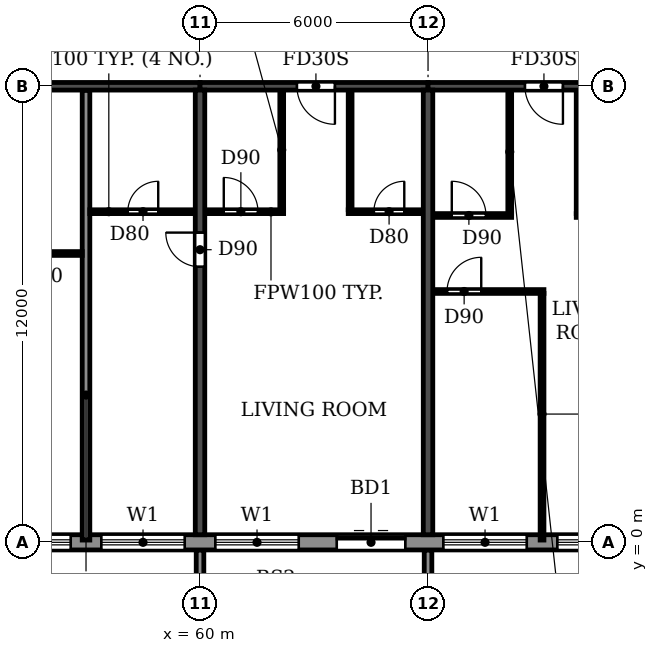
"""IFC4 building model, lengths in metres.
Left out: names, types, materials, properties, quantities, classifications, styles, units other than length and angle.
Written with IfcOpenShell. Run it as: python <this file> out.ifc"""

import sys

from ifc_helpers import new_model, si_unit, direction, frame, frame_2d, origin, place, context, subcontext, project, spatial, polyline, rectangle, outline, extrude, source, transform, mapped, element, fill, save


model = new_model("IFC4")
c1 = context("Model", 3, precision=1e-05, world=origin(), true_north=direction((0.0, 1.0)))
c2 = subcontext(c1, "Body", "Model", "MODEL_VIEW")
j1 = project(units=[si_unit("LENGTHUNIT", "METRE"), si_unit("PLANEANGLEUNIT", "RADIAN")], contexts=[c1])
p1 = place(None, origin())
s1 = spatial("IfcSite", under=j1, at=p1, CompositionType="ELEMENT")
p2 = place(p1, origin())
s2 = spatial("IfcBuilding", under=s1, at=p2, CompositionType="ELEMENT")
p3 = place(p2, frame((0.0, 0.0, 257.7)))
s3 = spatial("IfcBuildingStorey", under=s2, at=p3, CompositionType="ELEMENT", Elevation=257.7)
p4 = place(p3, frame((60.0, 0.2, 0.0), z_axis=(0.0, 0.0, 1.0), x_axis=(0.0, 1.0, 0.0)))
e1 = element("IfcWall", 1, at=p4, inside=s3, PredefinedType="SHEAR", context=c2, shape_type="SweptSolid", body=[
    extrude(rectangle(XDim=11.7, YDim=0.25, at=frame_2d((5.85, 0.0))), origin(), (0.0, 0.0, 1.0), 3.0),
])
p5 = place(p4, frame((7.05, 0.0, 0.0)))
e2 = element("IfcOpeningElement", 2, at=p5, cuts=e1, PredefinedType="OPENING", context=c2, shape_type="SweptSolid", body=[
    extrude(rectangle(XDim=0.9, YDim=2.1, at=frame_2d((0.45, 1.05))), frame((0.0, 0.135, 0.0), z_axis=(0.0, -1.0, 0.0), x_axis=(1.0, 0.0, 0.0)), (0.0, 0.0, 1.0), 0.27),
])
p6 = place(p3, frame((66.0, 0.2, 0.0), z_axis=(0.0, 0.0, 1.0), x_axis=(0.0, 1.0, 0.0)))
e3 = element("IfcWall", 3, at=p6, inside=s3, PredefinedType="SHEAR", context=c2, shape_type="SweptSolid", body=[
    extrude(rectangle(XDim=11.7, YDim=0.25, at=frame_2d((5.85, 0.0))), origin(), (0.0, 0.0, 1.0), 3.0),
])
p7 = place(p3, frame((54.0, 12.0, 0.0), z_axis=(0.0, 0.0, 1.0), x_axis=(1.0, 0.0, 0.0)))
e4 = element("IfcWall", 4, at=p7, inside=s3, PredefinedType="SHEAR", context=c2, shape_type="SweptSolid", body=[
    extrude(rectangle(XDim=6.0, YDim=0.2, at=frame_2d((3.0, 0.0))), origin(), (0.0, 0.0, 1.0), 2.4),
])
p8 = place(p3, frame((60.0, 12.0, 0.0), z_axis=(0.0, 0.0, 1.0), x_axis=(1.0, 0.0, 0.0)))
e5 = element("IfcWall", 5, at=p8, inside=s3, PredefinedType="SHEAR", context=c2, shape_type="SweptSolid", body=[
    extrude(rectangle(XDim=6.0, YDim=0.2, at=frame_2d((3.0, 0.0))), origin(), (0.0, 0.0, 1.0), 2.4),
])
p9 = place(p8, frame((2.55, 0.0, 0.0)))
e6 = element("IfcOpeningElement", 6, at=p9, cuts=e5, PredefinedType="OPENING", context=c2, shape_type="SweptSolid", body=[
    extrude(rectangle(XDim=1.0, YDim=2.1, at=frame_2d((0.5, 1.05))), frame((0.0, 0.11, 0.0), z_axis=(0.0, -1.0, 0.0), x_axis=(1.0, 0.0, 0.0)), (0.0, 0.0, 1.0), 0.22),
])
p10 = place(p3, frame((66.0, 12.0, 0.0), z_axis=(0.0, 0.0, 1.0), x_axis=(1.0, 0.0, 0.0)))
e7 = element("IfcWall", 7, at=p10, inside=s3, PredefinedType="SHEAR", context=c2, shape_type="SweptSolid", body=[
    extrude(rectangle(XDim=6.0, YDim=0.2, at=frame_2d((3.0, 0.0))), origin(), (0.0, 0.0, 1.0), 2.4),
])
p11 = place(p10, frame((2.55, 0.0, 0.0)))
e8 = element("IfcOpeningElement", 8, at=p11, cuts=e7, PredefinedType="OPENING", context=c2, shape_type="SweptSolid", body=[
    extrude(rectangle(XDim=1.0, YDim=2.1, at=frame_2d((0.5, 1.05))), frame((0.0, 0.11, 0.0), z_axis=(0.0, -1.0, 0.0), x_axis=(1.0, 0.0, 0.0)), (0.0, 0.0, 1.0), 0.22),
])
p12 = place(p3, frame((22.683, 0.0, 0.0), z_axis=(0.0, 0.0, 1.0), x_axis=(1.0, 0.0, 0.0)))
e9 = element("IfcWall", 9, at=p12, inside=s3, PredefinedType="STANDARD", context=c2, shape_type="SweptSolid", body=[
    extrude(rectangle(XDim=56.634, YDim=0.4, at=frame_2d((28.317, 0.0))), origin(), (0.0, 0.0, 1.0), 3.0),
])
p13 = place(p12, frame((1.717, 0.0, 0.9)))
e10 = element("IfcOpeningElement", 10, at=p13, cuts=e9, PredefinedType="OPENING", context=c2, shape_type="SweptSolid", body=[
    extrude(rectangle(XDim=2.2, YDim=1.5, at=frame_2d((1.1, 0.75))), frame((0.0, 0.21, 0.0), z_axis=(0.0, -1.0, 0.0), x_axis=(1.0, 0.0, 0.0)), (0.0, 0.0, 1.0), 0.42),
])
p14 = place(p12, frame((4.917, 0.0, 0.0)))
e11 = element("IfcOpeningElement", 11, at=p14, cuts=e9, PredefinedType="OPENING", context=c2, shape_type="SweptSolid", body=[
    extrude(rectangle(XDim=1.8, YDim=2.4, at=frame_2d((0.9, 1.2))), frame((0.0, 0.21, 0.0), z_axis=(0.0, -1.0, 0.0), x_axis=(1.0, 0.0, 0.0)), (0.0, 0.0, 1.0), 0.42),
])
p15 = place(p12, frame((7.717, 0.0, 0.9)))
e12 = element("IfcOpeningElement", 12, at=p15, cuts=e9, PredefinedType="OPENING", context=c2, shape_type="SweptSolid", body=[
    extrude(rectangle(XDim=2.2, YDim=1.5, at=frame_2d((1.1, 0.75))), frame((0.0, 0.21, 0.0), z_axis=(0.0, -1.0, 0.0), x_axis=(1.0, 0.0, 0.0)), (0.0, 0.0, 1.0), 0.42),
])
p16 = place(p12, frame((10.717, 0.0, 0.9)))
e13 = element("IfcOpeningElement", 13, at=p16, cuts=e9, PredefinedType="OPENING", context=c2, shape_type="SweptSolid", body=[
    extrude(rectangle(XDim=2.2, YDim=1.5, at=frame_2d((1.1, 0.75))), frame((0.0, 0.21, 0.0), z_axis=(0.0, -1.0, 0.0), x_axis=(1.0, 0.0, 0.0)), (0.0, 0.0, 1.0), 0.42),
])
p17 = place(p12, frame((13.717, 0.0, 0.9)))
e14 = element("IfcOpeningElement", 14, at=p17, cuts=e9, PredefinedType="OPENING", context=c2, shape_type="SweptSolid", body=[
    extrude(rectangle(XDim=2.2, YDim=1.5, at=frame_2d((1.1, 0.75))), frame((0.0, 0.21, 0.0), z_axis=(0.0, -1.0, 0.0), x_axis=(1.0, 0.0, 0.0)), (0.0, 0.0, 1.0), 0.42),
])
p18 = place(p12, frame((16.917, 0.0, 0.0)))
e15 = element("IfcOpeningElement", 15, at=p18, cuts=e9, PredefinedType="OPENING", context=c2, shape_type="SweptSolid", body=[
    extrude(rectangle(XDim=1.8, YDim=2.4, at=frame_2d((0.9, 1.2))), frame((0.0, 0.21, 0.0), z_axis=(0.0, -1.0, 0.0), x_axis=(1.0, 0.0, 0.0)), (0.0, 0.0, 1.0), 0.42),
])
p19 = place(p12, frame((19.717, 0.0, 0.9)))
e16 = element("IfcOpeningElement", 16, at=p19, cuts=e9, PredefinedType="OPENING", context=c2, shape_type="SweptSolid", body=[
    extrude(rectangle(XDim=2.2, YDim=1.5, at=frame_2d((1.1, 0.75))), frame((0.0, 0.21, 0.0), z_axis=(0.0, -1.0, 0.0), x_axis=(1.0, 0.0, 0.0)), (0.0, 0.0, 1.0), 0.42),
])
p20 = place(p12, frame((22.717, 0.0, 0.9)))
e17 = element("IfcOpeningElement", 17, at=p20, cuts=e9, PredefinedType="OPENING", context=c2, shape_type="SweptSolid", body=[
    extrude(rectangle(XDim=2.2, YDim=1.5, at=frame_2d((1.1, 0.75))), frame((0.0, 0.21, 0.0), z_axis=(0.0, -1.0, 0.0), x_axis=(1.0, 0.0, 0.0)), (0.0, 0.0, 1.0), 0.42),
])
p21 = place(p12, frame((25.717, 0.0, 0.9)))
e18 = element("IfcOpeningElement", 18, at=p21, cuts=e9, PredefinedType="OPENING", context=c2, shape_type="SweptSolid", body=[
    extrude(rectangle(XDim=2.2, YDim=1.5, at=frame_2d((1.1, 0.75))), frame((0.0, 0.21, 0.0), z_axis=(0.0, -1.0, 0.0), x_axis=(1.0, 0.0, 0.0)), (0.0, 0.0, 1.0), 0.42),
])
p22 = place(p12, frame((28.917, 0.0, 0.0)))
e19 = element("IfcOpeningElement", 19, at=p22, cuts=e9, PredefinedType="OPENING", context=c2, shape_type="SweptSolid", body=[
    extrude(rectangle(XDim=1.8, YDim=2.4, at=frame_2d((0.9, 1.2))), frame((0.0, 0.21, 0.0), z_axis=(0.0, -1.0, 0.0), x_axis=(1.0, 0.0, 0.0)), (0.0, 0.0, 1.0), 0.42),
])
p23 = place(p12, frame((31.717, 0.0, 0.9)))
e20 = element("IfcOpeningElement", 20, at=p23, cuts=e9, PredefinedType="OPENING", context=c2, shape_type="SweptSolid", body=[
    extrude(rectangle(XDim=2.2, YDim=1.5, at=frame_2d((1.1, 0.75))), frame((0.0, 0.21, 0.0), z_axis=(0.0, -1.0, 0.0), x_axis=(1.0, 0.0, 0.0)), (0.0, 0.0, 1.0), 0.42),
])
p24 = place(p12, frame((34.717, 0.0, 0.9)))
e21 = element("IfcOpeningElement", 21, at=p24, cuts=e9, PredefinedType="OPENING", context=c2, shape_type="SweptSolid", body=[
    extrude(rectangle(XDim=2.2, YDim=1.5, at=frame_2d((1.1, 0.75))), frame((0.0, 0.21, 0.0), z_axis=(0.0, -1.0, 0.0), x_axis=(1.0, 0.0, 0.0)), (0.0, 0.0, 1.0), 0.42),
])
p25 = place(p12, frame((37.717, 0.0, 0.9)))
e22 = element("IfcOpeningElement", 22, at=p25, cuts=e9, PredefinedType="OPENING", context=c2, shape_type="SweptSolid", body=[
    extrude(rectangle(XDim=2.2, YDim=1.5, at=frame_2d((1.1, 0.75))), frame((0.0, 0.21, 0.0), z_axis=(0.0, -1.0, 0.0), x_axis=(1.0, 0.0, 0.0)), (0.0, 0.0, 1.0), 0.42),
])
p26 = place(p12, frame((40.917, 0.0, 0.0)))
e23 = element("IfcOpeningElement", 23, at=p26, cuts=e9, PredefinedType="OPENING", context=c2, shape_type="SweptSolid", body=[
    extrude(rectangle(XDim=1.8, YDim=2.4, at=frame_2d((0.9, 1.2))), frame((0.0, 0.21, 0.0), z_axis=(0.0, -1.0, 0.0), x_axis=(1.0, 0.0, 0.0)), (0.0, 0.0, 1.0), 0.42),
])
p27 = place(p12, frame((43.717, 0.0, 0.9)))
e24 = element("IfcOpeningElement", 24, at=p27, cuts=e9, PredefinedType="OPENING", context=c2, shape_type="SweptSolid", body=[
    extrude(rectangle(XDim=2.2, YDim=1.5, at=frame_2d((1.1, 0.75))), frame((0.0, 0.21, 0.0), z_axis=(0.0, -1.0, 0.0), x_axis=(1.0, 0.0, 0.0)), (0.0, 0.0, 1.0), 0.42),
])
p28 = place(p12, frame((46.717, 0.0, 0.9)))
e25 = element("IfcOpeningElement", 25, at=p28, cuts=e9, PredefinedType="OPENING", context=c2, shape_type="SweptSolid", body=[
    extrude(rectangle(XDim=2.2, YDim=1.5, at=frame_2d((1.1, 0.75))), frame((0.0, 0.21, 0.0), z_axis=(0.0, -1.0, 0.0), x_axis=(1.0, 0.0, 0.0)), (0.0, 0.0, 1.0), 0.42),
])
p29 = place(p12, frame((49.717, 0.0, 0.9)))
e26 = element("IfcOpeningElement", 26, at=p29, cuts=e9, PredefinedType="OPENING", context=c2, shape_type="SweptSolid", body=[
    extrude(rectangle(XDim=2.2, YDim=1.5, at=frame_2d((1.1, 0.75))), frame((0.0, 0.21, 0.0), z_axis=(0.0, -1.0, 0.0), x_axis=(1.0, 0.0, 0.0)), (0.0, 0.0, 1.0), 0.42),
])
p30 = place(p12, frame((52.917, 0.0, 0.0)))
e27 = element("IfcOpeningElement", 27, at=p30, cuts=e9, PredefinedType="OPENING", context=c2, shape_type="SweptSolid", body=[
    extrude(rectangle(XDim=1.8, YDim=2.4, at=frame_2d((0.9, 1.2))), frame((0.0, 0.21, 0.0), z_axis=(0.0, -1.0, 0.0), x_axis=(1.0, 0.0, 0.0)), (0.0, 0.0, 1.0), 0.42),
])
m1 = source(origin(), c2, "Body", "SweptSolid", [
    extrude(outline(polyline([(0.0, 0.0), (0.2, 0.0), (0.2, 1.65), (0.0, 1.65), (0.0, 0.0)])), origin(), (0.0, 0.0, 1.0), 3.1),
])
for number, where in (
    (28, (59.9, -1.85, 0.0)),
    (29, (65.9, -1.85, 0.0)),
):
    element("IfcWall", number, at=place(p3, frame(where)), inside=s3, PredefinedType="STANDARD", context=c2, shape_type="MappedRepresentation", body=[
        mapped(m1, transform((0.0, 0.0, 0.0))),
    ])
p31 = place(p3, frame((57.0, 0.06, 0.0), z_axis=(0.0, 0.0, 1.0), x_axis=(0.0, 1.0, 0.0)))
e30 = element("IfcWall", 30, at=p31, inside=s3, PredefinedType="PARTITIONING", context=c2, shape_type="SweptSolid", body=[
    extrude(rectangle(XDim=11.83, YDim=0.2, at=frame_2d((5.915, 0.0))), origin(), (0.0, 0.0, 1.0), 3.0),
])
p32 = place(p3, frame((66.135, 6.6, 0.0), z_axis=(0.0, 0.0, 1.0), x_axis=(1.0, 0.0, 0.0)))
e31 = element("IfcWall", 31, at=p32, inside=s3, PredefinedType="PARTITIONING", context=c2, shape_type="SweptSolid", body=[
    extrude(rectangle(XDim=2.915, YDim=0.1, at=frame_2d((1.458, 0.0))), origin(), (0.0, 0.0, 1.0), 3.0),
])
p33 = place(p32, frame((0.365, 0.0, 0.0)))
e32 = element("IfcOpeningElement", 32, at=p33, cuts=e31, PredefinedType="OPENING", context=c2, shape_type="SweptSolid", body=[
    extrude(rectangle(XDim=0.9, YDim=2.1, at=frame_2d((0.45, 1.05))), frame((0.0, 0.06, 0.0), z_axis=(0.0, -1.0, 0.0), x_axis=(1.0, 0.0, 0.0)), (0.0, 0.0, 1.0), 0.12),
])
p34 = place(p3, frame((54.135, 7.6, 0.0), z_axis=(0.0, 0.0, 1.0), x_axis=(1.0, 0.0, 0.0)))
e33 = element("IfcWall", 33, at=p34, inside=s3, PredefinedType="PARTITIONING", context=c2, shape_type="SweptSolid", body=[
    extrude(rectangle(XDim=2.765, YDim=0.1, at=frame_2d((1.382, 0.0))), origin(), (0.0, 0.0, 1.0), 3.0),
])
p35 = place(p34, frame((0.965, 0.0, 0.0)))
e34 = element("IfcOpeningElement", 34, at=p35, cuts=e33, PredefinedType="OPENING", context=c2, shape_type="SweptSolid", body=[
    extrude(rectangle(XDim=0.8, YDim=2.1, at=frame_2d((0.4, 1.05))), frame((0.0, 0.06, 0.0), z_axis=(0.0, -1.0, 0.0), x_axis=(1.0, 0.0, 0.0)), (0.0, 0.0, 1.0), 0.12),
])
p36 = place(p3, frame((66.135, 8.6, 0.0), z_axis=(0.0, 0.0, 1.0), x_axis=(1.0, 0.0, 0.0)))
e35 = element("IfcWall", 35, at=p36, inside=s3, PredefinedType="PARTITIONING", context=c2, shape_type="SweptSolid", body=[
    extrude(rectangle(XDim=2.065, YDim=0.1, at=frame_2d((1.032, 0.0))), origin(), (0.0, 0.0, 1.0), 3.0),
])
p37 = place(p36, frame((0.49, 0.0, 0.0)))
e36 = element("IfcOpeningElement", 36, at=p37, cuts=e35, PredefinedType="OPENING", context=c2, shape_type="SweptSolid", body=[
    extrude(rectangle(XDim=0.9, YDim=2.1, at=frame_2d((0.45, 1.05))), frame((0.0, 0.06, 0.0), z_axis=(0.0, -1.0, 0.0), x_axis=(1.0, 0.0, 0.0)), (0.0, 0.0, 1.0), 0.12),
])
p38 = place(p3, frame((69.9, 8.6, 0.0), z_axis=(0.0, 0.0, 1.0), x_axis=(1.0, 0.0, 0.0)))
e37 = element("IfcWall", 37, at=p38, inside=s3, PredefinedType="PARTITIONING", context=c2, shape_type="SweptSolid", body=[
    extrude(rectangle(XDim=1.965, YDim=0.1, at=frame_2d((0.982, 0.0))), origin(), (0.0, 0.0, 1.0), 3.0),
])
p39 = place(p38, frame((0.675, 0.0, 0.0)))
e38 = element("IfcOpeningElement", 38, at=p39, cuts=e37, PredefinedType="OPENING", context=c2, shape_type="SweptSolid", body=[
    extrude(rectangle(XDim=0.8, YDim=2.1, at=frame_2d((0.4, 1.05))), frame((0.0, 0.06, 0.0), z_axis=(0.0, -1.0, 0.0), x_axis=(1.0, 0.0, 0.0)), (0.0, 0.0, 1.0), 0.12),
])
p40 = place(p3, frame((57.1, 8.7, 0.0), z_axis=(0.0, 0.0, 1.0), x_axis=(1.0, 0.0, 0.0)))
e39 = element("IfcWall", 39, at=p40, inside=s3, PredefinedType="PARTITIONING", context=c2, shape_type="SweptSolid", body=[
    extrude(rectangle(XDim=2.765, YDim=0.1, at=frame_2d((1.382, 0.0))), origin(), (0.0, 0.0, 1.0), 3.0),
])
p41 = place(p40, frame((1.0, 0.0, 0.0)))
e40 = element("IfcOpeningElement", 40, at=p41, cuts=e39, PredefinedType="OPENING", context=c2, shape_type="SweptSolid", body=[
    extrude(rectangle(XDim=0.8, YDim=2.1, at=frame_2d((0.4, 1.05))), frame((0.0, 0.06, 0.0), z_axis=(0.0, -1.0, 0.0), x_axis=(1.0, 0.0, 0.0)), (0.0, 0.0, 1.0), 0.12),
])
p42 = place(p3, frame((60.135, 8.7, 0.0), z_axis=(0.0, 0.0, 1.0), x_axis=(1.0, 0.0, 0.0)))
e41 = element("IfcWall", 41, at=p42, inside=s3, PredefinedType="PARTITIONING", context=c2, shape_type="SweptSolid", body=[
    extrude(rectangle(XDim=2.065, YDim=0.1, at=frame_2d((1.032, 0.0))), origin(), (0.0, 0.0, 1.0), 3.0),
])
p43 = place(p42, frame((0.49, 0.0, 0.0)))
e42 = element("IfcOpeningElement", 42, at=p43, cuts=e41, PredefinedType="OPENING", context=c2, shape_type="SweptSolid", body=[
    extrude(rectangle(XDim=0.9, YDim=2.1, at=frame_2d((0.45, 1.05))), frame((0.0, 0.06, 0.0), z_axis=(0.0, -1.0, 0.0), x_axis=(1.0, 0.0, 0.0)), (0.0, 0.0, 1.0), 0.12),
])
p44 = place(p3, frame((63.9, 8.7, 0.0), z_axis=(0.0, 0.0, 1.0), x_axis=(1.0, 0.0, 0.0)))
e43 = element("IfcWall", 43, at=p44, inside=s3, PredefinedType="PARTITIONING", context=c2, shape_type="SweptSolid", body=[
    extrude(rectangle(XDim=1.965, YDim=0.1, at=frame_2d((0.982, 0.0))), origin(), (0.0, 0.0, 1.0), 3.0),
])
p45 = place(p44, frame((0.675, 0.0, 0.0)))
e44 = element("IfcOpeningElement", 44, at=p45, cuts=e43, PredefinedType="OPENING", context=c2, shape_type="SweptSolid", body=[
    extrude(rectangle(XDim=0.8, YDim=2.1, at=frame_2d((0.4, 1.05))), frame((0.0, 0.06, 0.0), z_axis=(0.0, -1.0, 0.0), x_axis=(1.0, 0.0, 0.0)), (0.0, 0.0, 1.0), 0.12),
])
for number, where, z_axis, x_axis in (
    (45, (62.15, 8.75, 0.0), (0.0, 0.0, 1.0), (0.0, 1.0, 0.0)),
    (46, (63.95, 8.75, 0.0), (0.0, 0.0, 1.0), (0.0, 1.0, 0.0)),
):
    element("IfcWall", number, at=place(p3, frame(where, z_axis=z_axis, x_axis=x_axis)), inside=s3, PredefinedType="PARTITIONING", context=c2, shape_type="SweptSolid", body=[
        extrude(rectangle(XDim=3.14, YDim=0.1, at=frame_2d((1.57, 0.0))), origin(), (0.0, 0.0, 1.0), 3.0),
    ])
p46 = place(p3, frame((68.15, 8.65, 0.0), z_axis=(0.0, 0.0, 1.0), x_axis=(0.0, 1.0, 0.0)))
e47 = element("IfcWall", 47, at=p46, inside=s3, PredefinedType="PARTITIONING", context=c2, shape_type="SweptSolid", body=[
    extrude(rectangle(XDim=3.24, YDim=0.1, at=frame_2d((1.62, 0.0))), origin(), (0.0, 0.0, 1.0), 3.0),
])
p47 = place(p3, frame((69.0, 0.06, 0.0), z_axis=(0.0, 0.0, 1.0), x_axis=(0.0, 1.0, 0.0)))
e48 = element("IfcWall", 48, at=p47, inside=s3, PredefinedType="PARTITIONING", context=c2, shape_type="SweptSolid", body=[
    extrude(rectangle(XDim=6.49, YDim=0.1, at=frame_2d((3.245, 0.0))), origin(), (0.0, 0.0, 1.0), 3.0),
])
p48 = place(p3, frame((69.95, 8.65, 0.0), z_axis=(0.0, 0.0, 1.0), x_axis=(0.0, 1.0, 0.0)))
e49 = element("IfcWall", 49, at=p48, inside=s3, PredefinedType="PARTITIONING", context=c2, shape_type="SweptSolid", body=[
    extrude(rectangle(XDim=3.24, YDim=0.1, at=frame_2d((1.62, 0.0))), origin(), (0.0, 0.0, 1.0), 3.0),
])
p49 = place(p23, origin())
e50 = element("IfcWindow", 50, at=p49, inside=s3, PartitioningType="DOUBLE_PANEL_HORIZONTAL", PredefinedType="WINDOW", context=c2, shape_type="SweptSolid", body=[
    extrude(rectangle(XDim=2.2, YDim=1.5, at=frame_2d((1.1, 0.75))), frame((0.0, 0.03, 0.0), z_axis=(0.0, -1.0, 0.0), x_axis=(1.0, 0.0, 0.0)), (0.0, 0.0, 1.0), 0.06),
])
fill(e20, e50)
p50 = place(p24, origin())
e51 = element("IfcWindow", 51, at=p50, inside=s3, PartitioningType="DOUBLE_PANEL_HORIZONTAL", PredefinedType="WINDOW", context=c2, shape_type="SweptSolid", body=[
    extrude(rectangle(XDim=2.2, YDim=1.5, at=frame_2d((1.1, 0.75))), frame((0.0, 0.03, 0.0), z_axis=(0.0, -1.0, 0.0), x_axis=(1.0, 0.0, 0.0)), (0.0, 0.0, 1.0), 0.06),
])
fill(e21, e51)
p51 = place(p25, origin())
e52 = element("IfcWindow", 52, at=p51, inside=s3, PartitioningType="DOUBLE_PANEL_HORIZONTAL", PredefinedType="WINDOW", context=c2, shape_type="SweptSolid", body=[
    extrude(rectangle(XDim=2.2, YDim=1.5, at=frame_2d((1.1, 0.75))), frame((0.0, 0.03, 0.0), z_axis=(0.0, -1.0, 0.0), x_axis=(1.0, 0.0, 0.0)), (0.0, 0.0, 1.0), 0.06),
])
fill(e22, e52)
p52 = place(p26, origin())
e53 = element("IfcDoor", 53, at=p52, inside=s3, OperationType="DOUBLE_DOOR_SLIDING", PredefinedType="DOOR", context=c2, shape_type="SweptSolid", body=[
    extrude(rectangle(XDim=1.8, YDim=2.4, at=frame_2d((0.9, 1.2))), frame((0.0, 0.025, 0.0), z_axis=(0.0, -1.0, 0.0), x_axis=(1.0, 0.0, 0.0)), (0.0, 0.0, 1.0), 0.05),
])
fill(e23, e53)
p53 = place(p27, origin())
e54 = element("IfcWindow", 54, at=p53, inside=s3, PartitioningType="DOUBLE_PANEL_HORIZONTAL", PredefinedType="WINDOW", context=c2, shape_type="SweptSolid", body=[
    extrude(rectangle(XDim=2.2, YDim=1.5, at=frame_2d((1.1, 0.75))), frame((0.0, 0.03, 0.0), z_axis=(0.0, -1.0, 0.0), x_axis=(1.0, 0.0, 0.0)), (0.0, 0.0, 1.0), 0.06),
])
fill(e24, e54)
p54 = place(p28, origin())
e55 = element("IfcWindow", 55, at=p54, inside=s3, PartitioningType="DOUBLE_PANEL_HORIZONTAL", PredefinedType="WINDOW", context=c2, shape_type="SweptSolid", body=[
    extrude(rectangle(XDim=2.2, YDim=1.5, at=frame_2d((1.1, 0.75))), frame((0.0, 0.03, 0.0), z_axis=(0.0, -1.0, 0.0), x_axis=(1.0, 0.0, 0.0)), (0.0, 0.0, 1.0), 0.06),
])
fill(e25, e55)
p55 = place(p41, origin())
e56 = element("IfcDoor", 56, at=p55, inside=s3, OperationType="SINGLE_SWING_RIGHT", PredefinedType="DOOR", context=c2, shape_type="SweptSolid", body=[
    extrude(rectangle(XDim=0.8, YDim=2.1, at=frame_2d((0.4, 1.05))), frame((0.0, 0.025, 0.0), z_axis=(0.0, -1.0, 0.0), x_axis=(1.0, 0.0, 0.0)), (0.0, 0.0, 1.0), 0.05),
])
fill(e40, e56)
p56 = place(p5, origin())
e57 = element("IfcDoor", 57, at=p56, inside=s3, OperationType="SINGLE_SWING_RIGHT", PredefinedType="DOOR", context=c2, shape_type="SweptSolid", body=[
    extrude(rectangle(XDim=0.9, YDim=2.1, at=frame_2d((0.45, 1.05))), frame((0.0, 0.025, 0.0), z_axis=(0.0, -1.0, 0.0), x_axis=(1.0, 0.0, 0.0)), (0.0, 0.0, 1.0), 0.05),
])
fill(e2, e57)
p57 = place(p43, origin())
e58 = element("IfcDoor", 58, at=p57, inside=s3, OperationType="SINGLE_SWING_LEFT", PredefinedType="DOOR", context=c2, shape_type="SweptSolid", body=[
    extrude(rectangle(XDim=0.9, YDim=2.1, at=frame_2d((0.45, 1.05))), frame((0.0, 0.025, 0.0), z_axis=(0.0, -1.0, 0.0), x_axis=(1.0, 0.0, 0.0)), (0.0, 0.0, 1.0), 0.05),
])
fill(e42, e58)
p58 = place(p9, frame((1.0, 0.0, 0.0), z_axis=(0.0, 0.0, 1.0), x_axis=(-1.0, 0.0, 0.0)))
e59 = element("IfcDoor", 59, at=p58, inside=s3, OperationType="SINGLE_SWING_LEFT", PredefinedType="DOOR", context=c2, shape_type="SweptSolid", body=[
    extrude(rectangle(XDim=1.0, YDim=2.1, at=frame_2d((0.5, 1.05))), frame((0.0, 0.025, 0.0), z_axis=(0.0, -1.0, 0.0), x_axis=(1.0, 0.0, 0.0)), (0.0, 0.0, 1.0), 0.05),
])
fill(e6, e59)
p59 = place(p45, origin())
e60 = element("IfcDoor", 60, at=p59, inside=s3, OperationType="SINGLE_SWING_RIGHT", PredefinedType="DOOR", context=c2, shape_type="SweptSolid", body=[
    extrude(rectangle(XDim=0.8, YDim=2.1, at=frame_2d((0.4, 1.05))), frame((0.0, 0.025, 0.0), z_axis=(0.0, -1.0, 0.0), x_axis=(1.0, 0.0, 0.0)), (0.0, 0.0, 1.0), 0.05),
])
fill(e44, e60)
p60 = place(p33, origin())
e61 = element("IfcDoor", 61, at=p60, inside=s3, OperationType="SINGLE_SWING_RIGHT", PredefinedType="DOOR", context=c2, shape_type="SweptSolid", body=[
    extrude(rectangle(XDim=0.9, YDim=2.1, at=frame_2d((0.45, 1.05))), frame((0.0, 0.025, 0.0), z_axis=(0.0, -1.0, 0.0), x_axis=(1.0, 0.0, 0.0)), (0.0, 0.0, 1.0), 0.05),
])
fill(e32, e61)
p61 = place(p37, origin())
e62 = element("IfcDoor", 62, at=p61, inside=s3, OperationType="SINGLE_SWING_LEFT", PredefinedType="DOOR", context=c2, shape_type="SweptSolid", body=[
    extrude(rectangle(XDim=0.9, YDim=2.1, at=frame_2d((0.45, 1.05))), frame((0.0, 0.025, 0.0), z_axis=(0.0, -1.0, 0.0), x_axis=(1.0, 0.0, 0.0)), (0.0, 0.0, 1.0), 0.05),
])
fill(e36, e62)
p62 = place(p11, frame((1.0, 0.0, 0.0), z_axis=(0.0, 0.0, 1.0), x_axis=(-1.0, 0.0, 0.0)))
e63 = element("IfcDoor", 63, at=p62, inside=s3, OperationType="SINGLE_SWING_LEFT", PredefinedType="DOOR", context=c2, shape_type="SweptSolid", body=[
    extrude(rectangle(XDim=1.0, YDim=2.1, at=frame_2d((0.5, 1.05))), frame((0.0, 0.025, 0.0), z_axis=(0.0, -1.0, 0.0), x_axis=(1.0, 0.0, 0.0)), (0.0, 0.0, 1.0), 0.05),
])
fill(e8, e63)
save(model, sys.argv[1])
